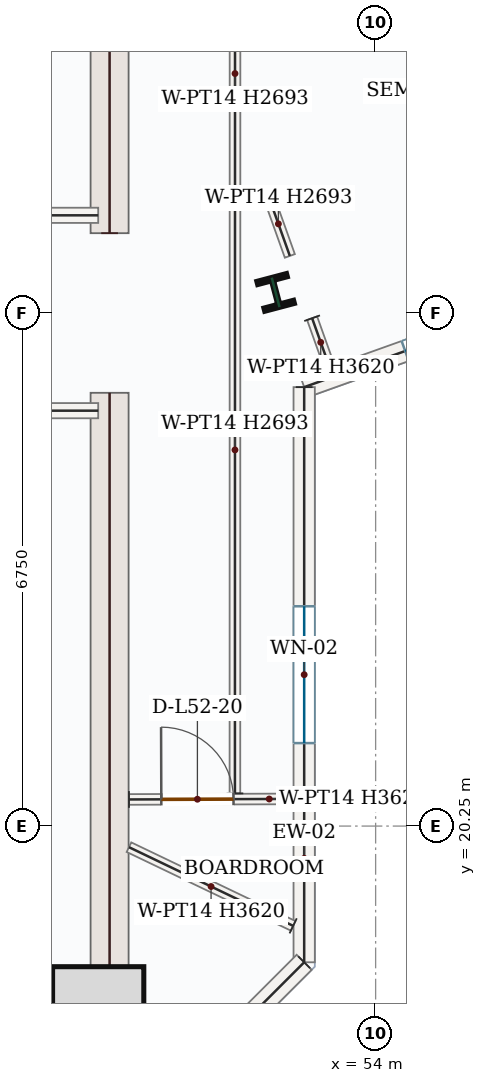
"""IFC4 building model, lengths in metres.
Left out: names, types, materials, properties, quantities, classifications, styles, units other than length and angle.
Written with IfcOpenShell. Run it as: python <this file> out.ifc"""

import sys

from ifc_helpers import new_model, si_unit, direction, frame, frame_2d, origin, origin_2d, place, context, subcontext, project, spatial, rectangle, i_section, extrude, source, transform, mapped, element, fill, save


model = new_model("IFC4")
c1 = context("Model", 3, precision=1e-05, world=origin(), true_north=direction((0.0, 1.0)))
c2 = subcontext(c1, "Body", "Model", "MODEL_VIEW")
j1 = project(units=[si_unit("LENGTHUNIT", "METRE"), si_unit("PLANEANGLEUNIT", "RADIAN")], contexts=[c1])
p1 = place(None, origin())
s1 = spatial("IfcSite", under=j1, at=p1, CompositionType="ELEMENT")
p2 = place(p1, origin())
s2 = spatial("IfcBuilding", under=s1, at=p2, CompositionType="ELEMENT")
p3 = place(p2, frame((0.0, 0.0, 221.4)))
s3 = spatial("IfcBuildingStorey", under=s2, at=p3, CompositionType="ELEMENT", Elevation=221.4)
m1 = source(origin(), c2, "Body", "SweptSolid", [
    extrude(rectangle(XDim=8.55, YDim=0.5, at=frame_2d((4.275, 0.0))), origin(), (0.0, 0.0, 1.0), 3.62),
])
for number, where, z_axis, x_axis in (
    (1, (50.5, 17.4, 0.0), (0.0, 0.0, 1.0), (0.0, 1.0, 0.0)),
    (2, (50.5, 28.05, 0.0), (0.0, 0.0, 1.0), (0.0, 1.0, 0.0)),
):
    element("IfcWall", number, at=place(p3, frame(where, z_axis=z_axis, x_axis=x_axis)), inside=s3, PredefinedType="SHEAR", context=c2, shape_type="MappedRepresentation", body=[
        mapped(m1, transform((0.0, 0.0, 0.0), x_axis=(1.0, 0.0, 0.0), y_axis=(0.0, 1.0, 0.0), z_axis=(0.0, 0.0, 1.0), scale=1.0)),
    ])
m2 = source(origin(), c2, "Body", "SweptSolid", [
    extrude(rectangle(XDim=1.2, YDim=1.2, at=origin_2d()), origin(), (0.0, 0.0, 1.0), 3.9),
])
p4 = place(p3, frame((50.35, 17.8, 0.0), z_axis=(0.0, 0.0, 1.0), x_axis=(1.0, 0.0, 0.0)))
e3 = element("IfcColumn", 3, at=p4, inside=s3, PredefinedType="COLUMN", context=c2, shape_type="MappedRepresentation", body=[
    mapped(m2, transform((0.0, 0.0, 0.0), x_axis=(1.0, 0.0, 0.0), y_axis=(0.0, 1.0, 0.0), z_axis=(0.0, 0.0, 1.0), scale=1.0)),
])
m3 = source(origin(), c2, "Body", "SweptSolid", [
    extrude(i_section(OverallWidth=0.404, OverallDepth=0.407, WebThickness=0.027, FlangeThickness=0.044, FilletRadius=0.018, at=origin_2d()), origin(), (0.0, 0.0, 1.0), 3.9),
])
p5 = place(p3, frame((52.684, 27.271, 0.0), z_axis=(0.0, 0.0, 1.0), x_axis=(0.966823388604, 0.255445757936, 0.0)))
e4 = element("IfcColumn", 4, at=p5, inside=s3, PredefinedType="COLUMN", context=c2, shape_type="MappedRepresentation", body=[
    mapped(m3, transform((0.0, 0.0, 0.0), x_axis=(1.0, 0.0, 0.0), y_axis=(0.0, 1.0, 0.0), z_axis=(0.0, 0.0, 1.0), scale=1.0)),
])
p6 = place(p3, frame((57.414, 27.581, 0.0), z_axis=(0.0, 0.0, 1.0), x_axis=(-0.941673795185, -0.336527062004, 0.0)))
e5 = element("IfcWall", 5, at=p6, inside=s3, PredefinedType="SOLIDWALL", context=c2, shape_type="SweptSolid", body=[
    extrude(rectangle(XDim=4.624, YDim=0.28, at=frame_2d((2.312, 0.0))), origin(), (0.0, 0.0, 1.0), 3.62),
])
p7 = place(p6, frame((1.412, 0.0, 0.85)))
e6 = element("IfcOpeningElement", 6, at=p7, cuts=e5, PredefinedType="OPENING", context=c2, shape_type="SweptSolid", body=[
    extrude(rectangle(XDim=1.8, YDim=1.75, at=frame_2d((0.9, 0.875))), frame((0.0, 0.15, 0.0), z_axis=(0.0, -1.0, 0.0), x_axis=(1.0, 0.0, 0.0)), (0.0, 0.0, 1.0), 0.3),
])
p8 = place(p3, frame((53.06, 26.025, 0.0), z_axis=(0.0, 0.0, 1.0), x_axis=(0.0, -1.0, 0.0)))
e7 = element("IfcWall", 7, at=p8, inside=s3, PredefinedType="SOLIDWALL", context=c2, shape_type="SweptSolid", body=[
    extrude(rectangle(XDim=7.567, YDim=0.28, at=frame_2d((3.783, 0.0))), origin(), (0.0, 0.0, 1.0), 3.62),
])
p9 = place(p8, frame((2.883, 0.0, 0.85)))
e8 = element("IfcOpeningElement", 8, at=p9, cuts=e7, PredefinedType="OPENING", context=c2, shape_type="SweptSolid", body=[
    extrude(rectangle(XDim=1.8, YDim=1.75, at=frame_2d((0.9, 0.875))), frame((0.0, 0.15, 0.0), z_axis=(0.0, -1.0, 0.0), x_axis=(1.0, 0.0, 0.0)), (0.0, 0.0, 1.0), 0.3),
])
p10 = place(p3, frame((53.06, 18.458, 0.0), z_axis=(0.0, 0.0, 1.0), x_axis=(-0.707106781187, -0.707106781187, 0.0)))
e9 = element("IfcWall", 9, at=p10, inside=s3, PredefinedType="SOLIDWALL", context=c2, shape_type="SweptSolid", body=[
    extrude(rectangle(XDim=5.258, YDim=0.28, at=frame_2d((2.629, 0.0))), origin(), (0.0, 0.0, 1.0), 3.62),
])
p11 = place(p10, frame((1.729, 0.0, 0.85)))
e10 = element("IfcOpeningElement", 10, at=p11, cuts=e9, PredefinedType="OPENING", context=c2, shape_type="SweptSolid", body=[
    extrude(rectangle(XDim=1.8, YDim=1.75, at=frame_2d((0.9, 0.875))), frame((0.0, 0.15, 0.0), z_axis=(0.0, -1.0, 0.0), x_axis=(1.0, 0.0, 0.0)), (0.0, 0.0, 1.0), 0.3),
])
m4 = source(origin(), c2, "Body", "SweptSolid", [
    extrude(rectangle(XDim=4.25, YDim=0.2, at=frame_2d((2.125, 0.0))), origin(), (0.0, 0.0, 1.0), 3.62),
])
for number, where, z_axis, x_axis in (
    (11, (46.1, 25.715, 0.0), (0.0, 0.0, 1.0), (1.0, 0.0, 0.0)),
    (12, (46.1, 28.285, 0.0), (0.0, 0.0, 1.0), (1.0, 0.0, 0.0)),
):
    element("IfcWall", number, at=place(p3, frame(where, z_axis=z_axis, x_axis=x_axis)), inside=s3, PredefinedType="SOLIDWALL", context=c2, shape_type="MappedRepresentation", body=[
        mapped(m4, transform((0.0, 0.0, 0.0), x_axis=(1.0, 0.0, 0.0), y_axis=(0.0, 1.0, 0.0), z_axis=(0.0, 0.0, 1.0), scale=1.0)),
    ])
p12 = place(p3, frame((50.755, 20.6, 0.0), z_axis=(0.0, 0.0, 1.0), x_axis=(0.999994277874, 0.003382930575, 0.0)))
e13 = element("IfcWall", 13, at=p12, inside=s3, PredefinedType="PARTITIONING", context=c2, shape_type="SweptSolid", body=[
    extrude(rectangle(XDim=2.165, YDim=0.14, at=frame_2d((1.083, 0.0))), origin(), (0.0, 0.0, 1.0), 3.62),
])
p13 = place(p12, frame((0.425, 0.0, 0.0)))
e14 = element("IfcOpeningElement", 14, at=p13, cuts=e13, PredefinedType="OPENING", context=c2, shape_type="SweptSolid", body=[
    extrude(rectangle(XDim=0.95, YDim=2.15, at=frame_2d((0.475, 1.075))), frame((0.0, 0.08, 0.0), z_axis=(0.0, -1.0, 0.0), x_axis=(1.0, 0.0, 0.0)), (0.0, 0.0, 1.0), 0.16),
])
m5 = source(origin(), c2, "Body", "SweptSolid", [
    extrude(rectangle(XDim=9.038, YDim=0.14, at=frame_2d((4.519, 0.0))), origin(), (0.0, 0.0, 1.0), 2.693),
])
p14 = place(p3, frame((52.149, 20.68, 0.0), z_axis=(0.0, 0.0, 1.0), x_axis=(0.000135065776, 0.999999990879, 0.0)))
e15 = element("IfcWall", 15, at=p14, inside=s3, PredefinedType="PARTITIONING", context=c2, shape_type="MappedRepresentation", body=[
    mapped(m5, transform((0.0, 0.0, 0.0), x_axis=(1.0, 0.0, 0.0), y_axis=(0.0, 1.0, 0.0), z_axis=(0.0, 0.0, 1.0), scale=1.0)),
])
m6 = source(origin(), c2, "Body", "SweptSolid", [
    extrude(rectangle(XDim=0.896, YDim=0.14, at=frame_2d((0.448, 0.0))), origin(), (0.0, 0.0, 1.0), 2.693),
])
p15 = place(p3, frame((52.57, 28.595, 0.0), z_axis=(0.0, 0.0, 1.0), x_axis=(0.336509001165, -0.941680249413, 0.0)))
e16 = element("IfcWall", 16, at=p15, inside=s3, PredefinedType="PARTITIONING", context=c2, shape_type="MappedRepresentation", body=[
    mapped(m6, transform((0.0, 0.0, 0.0), x_axis=(1.0, 0.0, 0.0), y_axis=(0.0, 1.0, 0.0), z_axis=(0.0, 0.0, 1.0), scale=1.0)),
])
m7 = source(origin(), c2, "Body", "SweptSolid", [
    extrude(rectangle(XDim=0.674, YDim=0.14, at=frame_2d((0.337, 0.0))), origin(), (0.0, 0.0, 1.0), 3.62),
])
p16 = place(p3, frame((53.164, 26.931, 0.0), z_axis=(0.0, 0.0, 1.0), x_axis=(0.336588856473, -0.941651709337, 0.0)))
e17 = element("IfcWall", 17, at=p16, inside=s3, PredefinedType="PARTITIONING", context=c2, shape_type="MappedRepresentation", body=[
    mapped(m7, transform((0.0, 0.0, 0.0), x_axis=(1.0, 0.0, 0.0), y_axis=(0.0, 1.0, 0.0), z_axis=(0.0, 0.0, 1.0), scale=1.0)),
])
m8 = source(origin(), c2, "Body", "SweptSolid", [
    extrude(rectangle(XDim=2.395, YDim=0.14, at=frame_2d((1.198, 0.0))), origin(), (0.0, 0.0, 1.0), 3.62),
])
p17 = place(p3, frame((52.915, 18.937, 0.0), z_axis=(0.0, 0.0, 1.0), x_axis=(-0.90180278892, 0.432147810242, 0.0)))
e18 = element("IfcWall", 18, at=p17, inside=s3, PredefinedType="PARTITIONING", context=c2, shape_type="MappedRepresentation", body=[
    mapped(m8, transform((0.0, 0.0, 0.0), x_axis=(1.0, 0.0, 0.0), y_axis=(0.0, 1.0, 0.0), z_axis=(0.0, 0.0, 1.0), scale=1.0)),
])
p18 = place(p3, frame((52.15, 29.829, 0.0), z_axis=(0.0, 0.0, 1.0), x_axis=(0.0, 1.0, 0.0)))
e19 = element("IfcWall", 19, at=p18, inside=s3, PredefinedType="PARTITIONING", context=c2, shape_type="SweptSolid", body=[
    extrude(rectangle(XDim=1.966, YDim=0.14, at=frame_2d((0.983, 0.0))), origin(), (0.0, 0.0, 1.0), 2.693),
])
p19 = place(p18, frame((0.792, 0.0, 0.0)))
e20 = element("IfcOpeningElement", 20, at=p19, cuts=e19, PredefinedType="OPENING", context=c2, shape_type="SweptSolid", body=[
    extrude(rectangle(XDim=0.95, YDim=2.15, at=frame_2d((0.475, 1.075))), frame((0.0, 0.08, 0.0), z_axis=(0.0, -1.0, 0.0), x_axis=(1.0, 0.0, 0.0)), (0.0, 0.0, 1.0), 0.16),
])
m9 = source(origin(), c2, "Body", "SweptSolid", [
    extrude(rectangle(XDim=1.8, YDim=1.75, at=frame_2d((0.9, 0.875))), frame((0.0, 0.03, 0.0), z_axis=(0.0, -1.0, 0.0), x_axis=(1.0, 0.0, 0.0)), (0.0, 0.0, 1.0), 0.06),
])
p20 = place(p7, origin())
e21 = element("IfcWindow", 21, at=p20, inside=s3, PartitioningType="DOUBLE_PANEL_VERTICAL", PredefinedType="WINDOW", context=c2, shape_type="MappedRepresentation", body=[
    mapped(m9, transform((0.0, 0.0, 0.0), x_axis=(1.0, 0.0, 0.0), y_axis=(0.0, 1.0, 0.0), z_axis=(0.0, 0.0, 1.0), scale=1.0)),
])
fill(e6, e21)
p21 = place(p9, origin())
e22 = element("IfcWindow", 22, at=p21, inside=s3, PartitioningType="DOUBLE_PANEL_VERTICAL", PredefinedType="WINDOW", context=c2, shape_type="MappedRepresentation", body=[
    mapped(m9, transform((0.0, 0.0, 0.0), x_axis=(1.0, 0.0, 0.0), y_axis=(0.0, 1.0, 0.0), z_axis=(0.0, 0.0, 1.0), scale=1.0)),
])
fill(e8, e22)
m10 = source(origin(), c2, "Body", "SweptSolid", [
    extrude(rectangle(XDim=0.95, YDim=2.15, at=frame_2d((0.475, 1.075))), frame((0.0, 0.025, 0.0), z_axis=(0.0, -1.0, 0.0), x_axis=(1.0, 0.0, 0.0)), (0.0, 0.0, 1.0), 0.05),
])
p22 = place(p13, origin())
e23 = element("IfcDoor", 23, at=p22, inside=s3, OperationType="SINGLE_SWING_LEFT", PredefinedType="DOOR", context=c2, shape_type="MappedRepresentation", body=[
    mapped(m10, transform((0.0, 0.0, 0.0), x_axis=(1.0, 0.0, 0.0), y_axis=(0.0, 1.0, 0.0), z_axis=(0.0, 0.0, 1.0), scale=1.0)),
])
fill(e14, e23)
save(model, sys.argv[1])
